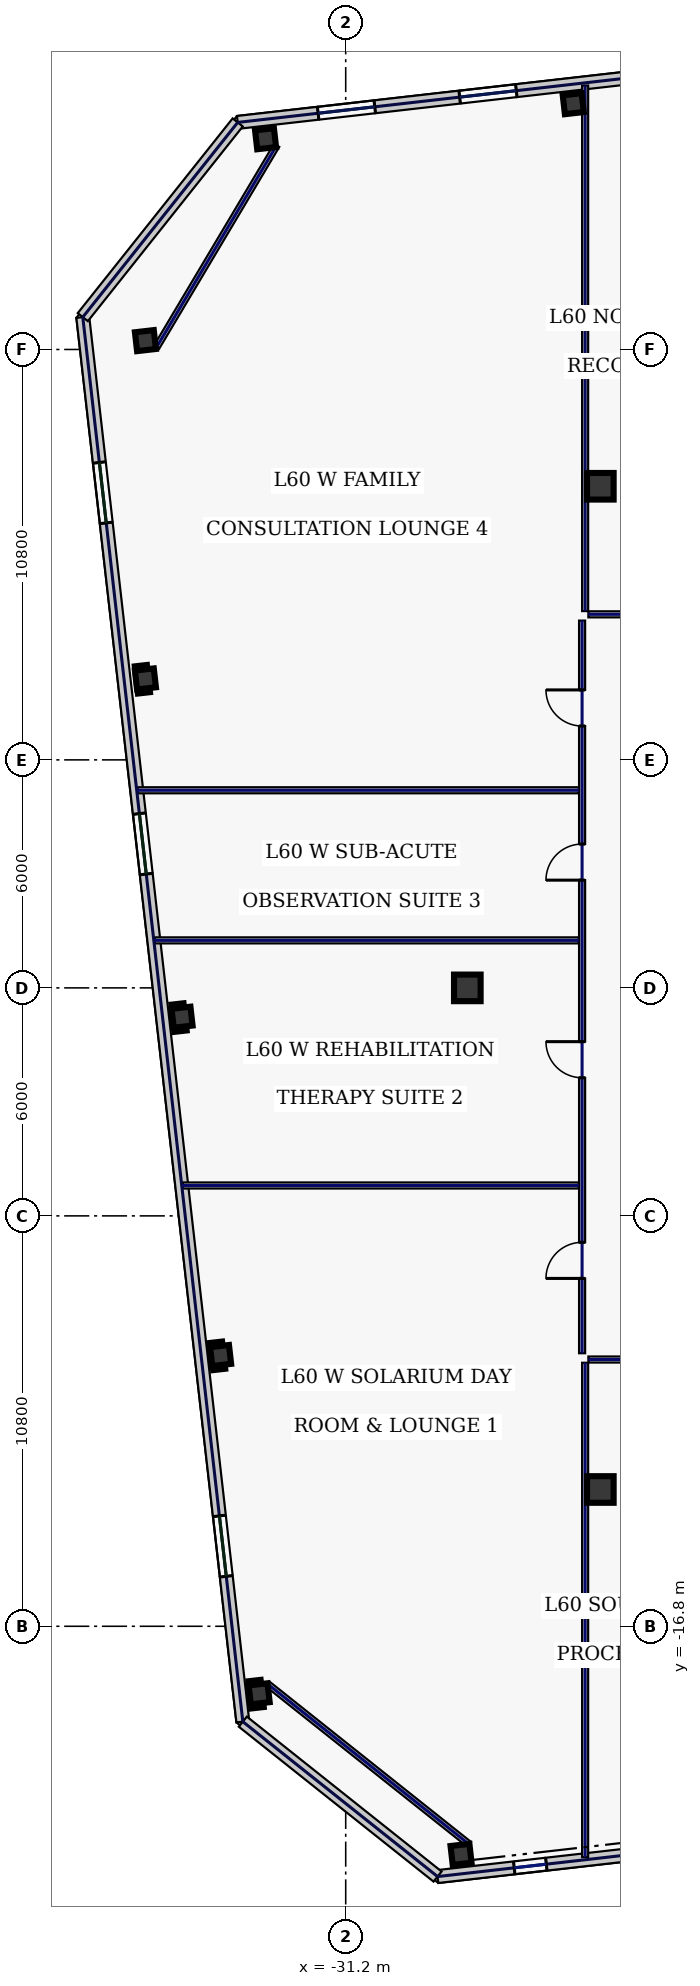
"""IFC4 building model, lengths in metres.
Left out: names, types, materials, properties, quantities, classifications, styles, units other than length and angle.
Written with IfcOpenShell. Run it as: python <this file> out.ifc"""

import sys

from ifc_helpers import new_model, si_unit, direction, frame, frame_2d, origin, origin_2d, place, context, subcontext, project, spatial, rectangle, hollow_rectangle, extrude, element, fill, save


model = new_model("IFC4")
c1 = context("Model", 3, precision=1e-05, world=origin(), true_north=direction((0.0, 1.0)))
c2 = subcontext(c1, "Body", "Model", "MODEL_VIEW")
j1 = project(units=[si_unit("LENGTHUNIT", "METRE"), si_unit("PLANEANGLEUNIT", "RADIAN")], contexts=[c1])
p1 = place(None, origin())
s1 = spatial("IfcSite", under=j1, at=p1, CompositionType="ELEMENT")
p2 = place(p1, origin())
s2 = spatial("IfcBuilding", under=s1, at=p2, CompositionType="ELEMENT")
p3 = place(p2, frame((0.0, 0.0, 259.0)))
s3 = spatial("IfcBuildingStorey", under=s2, at=p3, CompositionType="ELEMENT", Elevation=259.0)
for number, where, z_axis, x_axis in (
    (1, (-24.5, -13.2, 0.0), (0.0, 0.0, 1.0), (1.0, 0.0, 0.0)),
    (2, (-24.5, 13.2, 0.0), (0.0, 0.0, 1.0), (1.0, 0.0, 0.0)),
    (3, (-28.0, 0.0, 0.0), (0.0, 0.0, 1.0), (1.0, 0.0, 0.0)),
):
    element("IfcColumn", number, at=place(p3, frame(where, z_axis=z_axis, x_axis=x_axis)), inside=s3, PredefinedType="COLUMN", context=c2, shape_type="SweptSolid", body=[
        extrude(hollow_rectangle(XDim=0.7, YDim=0.7, WallThickness=0.032, at=origin_2d()), origin(), (0.0, 0.0, 1.0), 3.74),
    ])
for number, where, z_axis, x_axis in (
    (4, (-28.165, -22.802, 0.0), (0.0, 0.0, 1.0), (0.994, 0.113, 0.0)),
    (5, (-25.212, 23.268, 0.0), (0.0, 0.0, 1.0), (0.994, 0.113, 0.0)),
    (6, (-33.309, 22.345, 0.0), (0.0, 0.0, 1.0), (0.994, 0.113, 0.0)),
    (7, (-36.47, 17.033, 0.0), (0.0, 0.0, 1.0), (0.994, 0.113, 0.0)),
    (8, (-36.47, 8.131, 0.0), (0.0, 0.0, 1.0), (0.994, 0.113, 0.0)),
    (9, (-35.506, -0.772, 0.0), (0.0, 0.0, 1.0), (0.994, 0.113, 0.0)),
    (10, (-34.491, -9.674, 0.0), (0.0, 0.0, 1.0), (0.994, 0.113, 0.0)),
    (11, (-33.477, -18.577, 0.0), (0.0, 0.0, 1.0), (0.994, 0.113, 0.0)),
):
    element("IfcColumn", number, at=place(p3, frame(where, z_axis=z_axis, x_axis=x_axis)), inside=s3, PredefinedType="COLUMN", context=c2, shape_type="SweptSolid", body=[
        extrude(hollow_rectangle(XDim=0.5, YDim=0.5, WallThickness=0.025, at=origin_2d()), origin(), (0.0, 0.0, 1.0), 3.74),
    ])
p4 = place(p3, frame((-28.783, -23.386, 0.0), z_axis=(0.0, 0.0, 1.0), x_axis=(0.993572271362, 0.113199565282, 0.0)))
e12 = element("IfcWall", 12, at=p4, inside=s3, PredefinedType="STANDARD", context=c2, shape_type="SweptSolid", body=[
    extrude(rectangle(XDim=18.651, YDim=0.34, at=frame_2d((9.326, 0.0))), origin(), (0.0, 0.0, 1.0), 3.74),
])
p5 = place(p4, frame((2.03, 0.0, 0.88)))
e13 = element("IfcOpeningElement", 13, at=p5, cuts=e12, PredefinedType="OPENING", context=c2, shape_type="SweptSolid", body=[
    extrude(rectangle(XDim=0.85, YDim=1.85, at=frame_2d((0.425, 0.925))), frame((0.0, 0.18, 0.0), z_axis=(0.0, -1.0, 0.0), x_axis=(1.0, 0.0, 0.0)), (0.0, 0.0, 1.0), 0.36),
])
p6 = place(p4, frame((5.779, 0.0, 0.88)))
e14 = element("IfcOpeningElement", 14, at=p6, cuts=e12, PredefinedType="OPENING", context=c2, shape_type="SweptSolid", body=[
    extrude(rectangle(XDim=1.7, YDim=1.95, at=frame_2d((0.85, 0.975))), frame((0.0, 0.18, 0.0), z_axis=(0.0, -1.0, 0.0), x_axis=(1.0, 0.0, 0.0)), (0.0, 0.0, 1.0), 0.36),
])
p7 = place(p4, frame((10.179, 0.0, 0.88)))
e15 = element("IfcOpeningElement", 15, at=p7, cuts=e12, PredefinedType="OPENING", context=c2, shape_type="SweptSolid", body=[
    extrude(rectangle(XDim=1.7, YDim=1.95, at=frame_2d((0.85, 0.975))), frame((0.0, 0.18, 0.0), z_axis=(0.0, -1.0, 0.0), x_axis=(1.0, 0.0, 0.0)), (0.0, 0.0, 1.0), 0.36),
])
p8 = place(p4, frame((13.927, 0.0, 0.88)))
e16 = element("IfcOpeningElement", 16, at=p8, cuts=e12, PredefinedType="OPENING", context=c2, shape_type="SweptSolid", body=[
    extrude(rectangle(XDim=1.7, YDim=1.95, at=frame_2d((0.85, 0.975))), frame((0.0, 0.18, 0.0), z_axis=(0.0, -1.0, 0.0), x_axis=(1.0, 0.0, 0.0)), (0.0, 0.0, 1.0), 0.36),
])
p9 = place(p3, frame((-15.51, 24.886, 0.0), z_axis=(0.0, 0.0, 1.0), x_axis=(-0.993572271362, -0.113199565282, 0.0)))
e17 = element("IfcWall", 17, at=p9, inside=s3, PredefinedType="STANDARD", context=c2, shape_type="SweptSolid", body=[
    extrude(rectangle(XDim=18.651, YDim=0.34, at=frame_2d((9.326, 0.0))), origin(), (0.0, 0.0, 1.0), 3.74),
])
p10 = place(p9, frame((15.021, 0.0, 0.83)))
e18 = element("IfcOpeningElement", 18, at=p10, cuts=e17, PredefinedType="OPENING", context=c2, shape_type="SweptSolid", body=[
    extrude(rectangle(XDim=1.5, YDim=2.0, at=frame_2d((0.75, 1.0))), frame((0.0, 0.18, 0.0), z_axis=(0.0, -1.0, 0.0), x_axis=(1.0, 0.0, 0.0)), (0.0, 0.0, 1.0), 0.36),
])
p11 = place(p9, frame((11.273, 0.0, 0.83)))
e19 = element("IfcOpeningElement", 19, at=p11, cuts=e17, PredefinedType="OPENING", context=c2, shape_type="SweptSolid", body=[
    extrude(rectangle(XDim=1.5, YDim=2.0, at=frame_2d((0.75, 1.0))), frame((0.0, 0.18, 0.0), z_axis=(0.0, -1.0, 0.0), x_axis=(1.0, 0.0, 0.0)), (0.0, 0.0, 1.0), 0.36),
])
p12 = place(p9, frame((6.873, 0.0, 0.83)))
e20 = element("IfcOpeningElement", 20, at=p12, cuts=e17, PredefinedType="OPENING", context=c2, shape_type="SweptSolid", body=[
    extrude(rectangle(XDim=1.5, YDim=2.0, at=frame_2d((0.75, 1.0))), frame((0.0, 0.18, 0.0), z_axis=(0.0, -1.0, 0.0), x_axis=(1.0, 0.0, 0.0)), (0.0, 0.0, 1.0), 0.36),
])
p13 = place(p9, frame((3.125, 0.0, 0.83)))
e21 = element("IfcOpeningElement", 21, at=p13, cuts=e17, PredefinedType="OPENING", context=c2, shape_type="SweptSolid", body=[
    extrude(rectangle(XDim=0.85, YDim=1.85, at=frame_2d((0.425, 0.925))), frame((0.0, 0.18, 0.0), z_axis=(0.0, -1.0, 0.0), x_axis=(1.0, 0.0, 0.0)), (0.0, 0.0, 1.0), 0.36),
])
p14 = place(p3, frame((-38.118, 17.651, 0.0), z_axis=(0.0, 0.0, 1.0), x_axis=(0.11320360501, -0.9935718111, 0.0)))
e22 = element("IfcWall", 22, at=p14, inside=s3, PredefinedType="STANDARD", context=c2, shape_type="SweptSolid", body=[
    extrude(rectangle(XDim=37.2, YDim=0.34, at=frame_2d((18.6, 0.0))), origin(), (0.0, 0.0, 1.0), 3.74),
])
p15 = place(p14, frame((3.85, 0.0, 0.58)))
e23 = element("IfcOpeningElement", 23, at=p15, cuts=e22, PredefinedType="OPENING", context=c2, shape_type="SweptSolid", body=[
    extrude(rectangle(XDim=1.6, YDim=2.3, at=frame_2d((0.8, 1.15))), frame((0.0, 0.18, 0.0), z_axis=(0.0, -1.0, 0.0), x_axis=(1.0, 0.0, 0.0)), (0.0, 0.0, 1.0), 0.36),
])
p16 = place(p14, frame((13.15, 0.0, 0.58)))
e24 = element("IfcOpeningElement", 24, at=p16, cuts=e22, PredefinedType="OPENING", context=c2, shape_type="SweptSolid", body=[
    extrude(rectangle(XDim=1.6, YDim=2.3, at=frame_2d((0.8, 1.15))), frame((0.0, 0.18, 0.0), z_axis=(0.0, -1.0, 0.0), x_axis=(1.0, 0.0, 0.0)), (0.0, 0.0, 1.0), 0.36),
])
p17 = place(p14, frame((31.75, 0.0, 0.58)))
e25 = element("IfcOpeningElement", 25, at=p17, cuts=e22, PredefinedType="OPENING", context=c2, shape_type="SweptSolid", body=[
    extrude(rectangle(XDim=1.6, YDim=2.3, at=frame_2d((0.8, 1.15))), frame((0.0, 0.18, 0.0), z_axis=(0.0, -1.0, 0.0), x_axis=(1.0, 0.0, 0.0)), (0.0, 0.0, 1.0), 0.36),
])
for number, where, z_axis, x_axis in (
    (26, (-34.042, 22.775, 0.0), (0.0, 0.0, 1.0), (-0.623, -0.783, 0.0)),
    (27, (-33.907, -19.31, 0.0), (0.0, 0.0, 1.0), (0.783, -0.623, 0.0)),
):
    element("IfcWall", number, at=place(p3, frame(where, z_axis=z_axis, x_axis=x_axis)), inside=s3, PredefinedType="STANDARD", context=c2, shape_type="SweptSolid", body=[
        extrude(rectangle(XDim=6.548, YDim=0.34, at=frame_2d((3.274, 0.0))), origin(), (0.0, 0.0, 1.0), 3.74),
    ])
p18 = place(p3, frame((-33.016, 22.171, 0.0), z_axis=(0.0, 0.0, 1.0), x_axis=(-0.511385266265, -0.859351563359, 0.0)))
e28 = element("IfcWall", 28, at=p18, inside=s3, PredefinedType="PARTITIONING", context=c2, shape_type="SweptSolid", body=[
    extrude(rectangle(XDim=6.182, YDim=0.16, at=frame_2d((3.091, 0.0))), origin(), (0.0, 0.0, 1.0), 3.74),
])
p19 = place(p3, frame((-33.265, -18.311, 0.0), z_axis=(0.0, 0.0, 1.0), x_axis=(0.782602647064, -0.622521563328, 0.0)))
e29 = element("IfcWall", 29, at=p19, inside=s3, PredefinedType="PARTITIONING", context=c2, shape_type="SweptSolid", body=[
    extrude(rectangle(XDim=6.788, YDim=0.16, at=frame_2d((3.394, 0.0))), origin(), (0.0, 0.0, 1.0), 3.74),
])
p20 = place(p3, frame((-24.98, -9.615, 0.0), z_axis=(0.0, 0.0, 1.0), x_axis=(0.0, 1.0, 0.0)))
e30 = element("IfcWall", 30, at=p20, inside=s3, PredefinedType="PARTITIONING", context=c2, shape_type="SweptSolid", body=[
    extrude(rectangle(XDim=19.28, YDim=0.16, at=frame_2d((9.64, 0.0))), origin(), (0.0, 0.0, 1.0), 3.74),
])
p21 = place(p20, frame((1.969, 0.0, 0.0)))
e31 = element("IfcOpeningElement", 31, at=p21, cuts=e30, PredefinedType="OPENING", context=c2, shape_type="SweptSolid", body=[
    extrude(rectangle(XDim=0.95, YDim=2.2, at=frame_2d((0.475, 1.1))), frame((0.0, 0.09, 0.0), z_axis=(0.0, -1.0, 0.0), x_axis=(1.0, 0.0, 0.0)), (0.0, 0.0, 1.0), 0.18),
])
p22 = place(p20, frame((7.25, 0.0, 0.0)))
e32 = element("IfcOpeningElement", 32, at=p22, cuts=e30, PredefinedType="OPENING", context=c2, shape_type="SweptSolid", body=[
    extrude(rectangle(XDim=0.95, YDim=2.2, at=frame_2d((0.475, 1.1))), frame((0.0, 0.09, 0.0), z_axis=(0.0, -1.0, 0.0), x_axis=(1.0, 0.0, 0.0)), (0.0, 0.0, 1.0), 0.18),
])
p23 = place(p20, frame((12.45, 0.0, 0.0)))
e33 = element("IfcOpeningElement", 33, at=p23, cuts=e30, PredefinedType="OPENING", context=c2, shape_type="SweptSolid", body=[
    extrude(rectangle(XDim=0.95, YDim=2.2, at=frame_2d((0.475, 1.1))), frame((0.0, 0.09, 0.0), z_axis=(0.0, -1.0, 0.0), x_axis=(1.0, 0.0, 0.0)), (0.0, 0.0, 1.0), 0.18),
])
p24 = place(p20, frame((16.506, 0.0, 0.0)))
e34 = element("IfcOpeningElement", 34, at=p24, cuts=e30, PredefinedType="OPENING", context=c2, shape_type="SweptSolid", body=[
    extrude(rectangle(XDim=0.95, YDim=2.2, at=frame_2d((0.475, 1.1))), frame((0.0, 0.09, 0.0), z_axis=(0.0, -1.0, 0.0), x_axis=(1.0, 0.0, 0.0)), (0.0, 0.0, 1.0), 0.18),
])
p25 = place(p3, frame((-24.815, 9.83, 0.0), z_axis=(0.0, 0.0, 1.0), x_axis=(1.0, 0.0, 0.0)))
e35 = element("IfcWall", 35, at=p25, inside=s3, PredefinedType="PARTITIONING", context=c2, shape_type="SweptSolid", body=[
    extrude(rectangle(XDim=49.63, YDim=0.16, at=frame_2d((24.815, 0.0))), origin(), (0.0, 0.0, 1.0), 3.74),
])
p26 = place(p25, frame((1.869, 0.0, 0.0)))
e36 = element("IfcOpeningElement", 36, at=p26, cuts=e35, PredefinedType="OPENING", context=c2, shape_type="SweptSolid", body=[
    extrude(rectangle(XDim=1.3, YDim=2.2, at=frame_2d((0.65, 1.1))), frame((0.0, 0.09, 0.0), z_axis=(0.0, -1.0, 0.0), x_axis=(1.0, 0.0, 0.0)), (0.0, 0.0, 1.0), 0.18),
])
p27 = place(p25, frame((7.613, 0.0, 0.0)))
e37 = element("IfcOpeningElement", 37, at=p27, cuts=e35, PredefinedType="OPENING", context=c2, shape_type="SweptSolid", body=[
    extrude(rectangle(XDim=0.95, YDim=2.2, at=frame_2d((0.475, 1.1))), frame((0.0, 0.09, 0.0), z_axis=(0.0, -1.0, 0.0), x_axis=(1.0, 0.0, 0.0)), (0.0, 0.0, 1.0), 0.18),
])
p28 = place(p25, frame((14.038, 0.0, 0.0)))
e38 = element("IfcOpeningElement", 38, at=p28, cuts=e35, PredefinedType="OPENING", context=c2, shape_type="SweptSolid", body=[
    extrude(rectangle(XDim=0.95, YDim=2.2, at=frame_2d((0.475, 1.1))), frame((0.0, 0.09, 0.0), z_axis=(0.0, -1.0, 0.0), x_axis=(1.0, 0.0, 0.0)), (0.0, 0.0, 1.0), 0.18),
])
p29 = place(p25, frame((21.125, 0.0, 0.0)))
e39 = element("IfcOpeningElement", 39, at=p29, cuts=e35, PredefinedType="OPENING", context=c2, shape_type="SweptSolid", body=[
    extrude(rectangle(XDim=1.3, YDim=2.2, at=frame_2d((0.65, 1.1))), frame((0.0, 0.09, 0.0), z_axis=(0.0, -1.0, 0.0), x_axis=(1.0, 0.0, 0.0)), (0.0, 0.0, 1.0), 0.18),
])
p30 = place(p25, frame((29.225, 0.0, 0.0)))
e40 = element("IfcOpeningElement", 40, at=p30, cuts=e35, PredefinedType="OPENING", context=c2, shape_type="SweptSolid", body=[
    extrude(rectangle(XDim=1.3, YDim=2.2, at=frame_2d((0.65, 1.1))), frame((0.0, 0.09, 0.0), z_axis=(0.0, -1.0, 0.0), x_axis=(1.0, 0.0, 0.0)), (0.0, 0.0, 1.0), 0.18),
])
p31 = place(p25, frame((36.312, 0.0, 0.0)))
e41 = element("IfcOpeningElement", 41, at=p31, cuts=e35, PredefinedType="OPENING", context=c2, shape_type="SweptSolid", body=[
    extrude(rectangle(XDim=0.95, YDim=2.2, at=frame_2d((0.475, 1.1))), frame((0.0, 0.09, 0.0), z_axis=(0.0, -1.0, 0.0), x_axis=(1.0, 0.0, 0.0)), (0.0, 0.0, 1.0), 0.18),
])
p32 = place(p25, frame((41.863, 0.0, 0.0)))
e42 = element("IfcOpeningElement", 42, at=p32, cuts=e35, PredefinedType="OPENING", context=c2, shape_type="SweptSolid", body=[
    extrude(rectangle(XDim=1.3, YDim=2.2, at=frame_2d((0.65, 1.1))), frame((0.0, 0.09, 0.0), z_axis=(0.0, -1.0, 0.0), x_axis=(1.0, 0.0, 0.0)), (0.0, 0.0, 1.0), 0.18),
])
p33 = place(p25, frame((46.806, 0.0, 0.0)))
e43 = element("IfcOpeningElement", 43, at=p33, cuts=e35, PredefinedType="OPENING", context=c2, shape_type="SweptSolid", body=[
    extrude(rectangle(XDim=0.95, YDim=2.2, at=frame_2d((0.475, 1.1))), frame((0.0, 0.09, 0.0), z_axis=(0.0, -1.0, 0.0), x_axis=(1.0, 0.0, 0.0)), (0.0, 0.0, 1.0), 0.18),
])
p34 = place(p3, frame((-15.065, -9.78, 0.0), z_axis=(0.0, 0.0, 1.0), x_axis=(-1.0, 0.0, 0.0)))
e44 = element("IfcWall", 44, at=p34, inside=s3, PredefinedType="PARTITIONING", context=c2, shape_type="SweptSolid", body=[
    extrude(rectangle(XDim=9.75, YDim=0.16, at=frame_2d((4.875, 0.0))), origin(), (0.0, 0.0, 1.0), 3.74),
])
p35 = place(p34, frame((6.926, 0.0, 0.0)))
e45 = element("IfcOpeningElement", 45, at=p35, cuts=e44, PredefinedType="OPENING", context=c2, shape_type="SweptSolid", body=[
    extrude(rectangle(XDim=0.95, YDim=2.2, at=frame_2d((0.475, 1.1))), frame((0.0, 0.09, 0.0), z_axis=(0.0, -1.0, 0.0), x_axis=(1.0, 0.0, 0.0)), (0.0, 0.0, 1.0), 0.18),
])
p36 = place(p34, frame((2.354, 0.0, 0.0)))
e46 = element("IfcOpeningElement", 46, at=p36, cuts=e44, PredefinedType="OPENING", context=c2, shape_type="SweptSolid", body=[
    extrude(rectangle(XDim=0.95, YDim=2.2, at=frame_2d((0.475, 1.1))), frame((0.0, 0.09, 0.0), z_axis=(0.0, -1.0, 0.0), x_axis=(1.0, 0.0, 0.0)), (0.0, 0.0, 1.0), 0.18),
])
p37 = place(p3, frame((-24.9, 9.915, 0.0), z_axis=(0.0, 0.0, 1.0), x_axis=(0.0, 1.0, 0.0)))
e47 = element("IfcWall", 47, at=p37, inside=s3, PredefinedType="PARTITIONING", context=c2, shape_type="SweptSolid", body=[
    extrude(rectangle(XDim=13.831, YDim=0.16, at=frame_2d((6.916, 0.0))), origin(), (0.0, 0.0, 1.0), 3.285),
])
p38 = place(p3, frame((-24.9, -22.873, 0.0), z_axis=(0.0, 0.0, 1.0), x_axis=(0.0, 1.0, 0.0)))
e48 = element("IfcWall", 48, at=p38, inside=s3, PredefinedType="PARTITIONING", context=c2, shape_type="SweptSolid", body=[
    extrude(rectangle(XDim=13.008, YDim=0.16, at=frame_2d((6.504, 0.0))), origin(), (0.0, 0.0, 1.0), 3.74),
])
p39 = place(p3, frame((-35.494, -5.2, 0.0), z_axis=(0.0, 0.0, 1.0), x_axis=(1.0, 0.0, 0.0)))
e49 = element("IfcWall", 49, at=p39, inside=s3, PredefinedType="PARTITIONING", context=c2, shape_type="SweptSolid", body=[
    extrude(rectangle(XDim=10.429, YDim=0.16, at=frame_2d((5.215, 0.0))), origin(), (0.0, 0.0, 1.0), 3.74),
])
p40 = place(p3, frame((-36.229, 1.25, 0.0), z_axis=(0.0, 0.0, 1.0), x_axis=(1.0, 0.0, 0.0)))
e50 = element("IfcWall", 50, at=p40, inside=s3, PredefinedType="PARTITIONING", context=c2, shape_type="SweptSolid", body=[
    extrude(rectangle(XDim=11.165, YDim=0.16, at=frame_2d((5.582, 0.0))), origin(), (0.0, 0.0, 1.0), 3.74),
])
p41 = place(p3, frame((-36.679, 5.2, 0.0), z_axis=(0.0, 0.0, 1.0), x_axis=(1.0, 0.0, 0.0)))
e51 = element("IfcWall", 51, at=p41, inside=s3, PredefinedType="PARTITIONING", context=c2, shape_type="SweptSolid", body=[
    extrude(rectangle(XDim=11.615, YDim=0.16, at=frame_2d((5.807, 0.0))), origin(), (0.0, 0.0, 1.0), 3.74),
])
p42 = place(p5, origin())
e52 = element("IfcWindow", 52, at=p42, inside=s3, PartitioningType="SINGLE_PANEL", PredefinedType="WINDOW", context=c2, shape_type="SweptSolid", body=[
    extrude(rectangle(XDim=0.85, YDim=1.85, at=frame_2d((0.425, 0.925))), frame((0.0, 0.03, 0.0), z_axis=(0.0, -1.0, 0.0), x_axis=(1.0, 0.0, 0.0)), (0.0, 0.0, 1.0), 0.06),
])
fill(e13, e52)
p43 = place(p10, origin())
e53 = element("IfcWindow", 53, at=p43, inside=s3, PartitioningType="SINGLE_PANEL", PredefinedType="WINDOW", context=c2, shape_type="SweptSolid", body=[
    extrude(rectangle(XDim=1.5, YDim=2.0, at=frame_2d((0.75, 1.0))), frame((0.0, 0.03, 0.0), z_axis=(0.0, -1.0, 0.0), x_axis=(1.0, 0.0, 0.0)), (0.0, 0.0, 1.0), 0.06),
])
fill(e18, e53)
p44 = place(p11, origin())
e54 = element("IfcWindow", 54, at=p44, inside=s3, PartitioningType="SINGLE_PANEL", PredefinedType="WINDOW", context=c2, shape_type="SweptSolid", body=[
    extrude(rectangle(XDim=1.5, YDim=2.0, at=frame_2d((0.75, 1.0))), frame((0.0, 0.03, 0.0), z_axis=(0.0, -1.0, 0.0), x_axis=(1.0, 0.0, 0.0)), (0.0, 0.0, 1.0), 0.06),
])
fill(e19, e54)
p45 = place(p15, origin())
e55 = element("IfcWindow", 55, at=p45, inside=s3, PartitioningType="SINGLE_PANEL", PredefinedType="WINDOW", context=c2, shape_type="SweptSolid", body=[
    extrude(rectangle(XDim=1.6, YDim=2.3, at=frame_2d((0.8, 1.15))), frame((0.0, 0.03, 0.0), z_axis=(0.0, -1.0, 0.0), x_axis=(1.0, 0.0, 0.0)), (0.0, 0.0, 1.0), 0.06),
])
fill(e23, e55)
p46 = place(p16, origin())
e56 = element("IfcWindow", 56, at=p46, inside=s3, PartitioningType="SINGLE_PANEL", PredefinedType="WINDOW", context=c2, shape_type="SweptSolid", body=[
    extrude(rectangle(XDim=1.6, YDim=2.3, at=frame_2d((0.8, 1.15))), frame((0.0, 0.03, 0.0), z_axis=(0.0, -1.0, 0.0), x_axis=(1.0, 0.0, 0.0)), (0.0, 0.0, 1.0), 0.06),
])
fill(e24, e56)
p47 = place(p17, origin())
e57 = element("IfcWindow", 57, at=p47, inside=s3, PartitioningType="SINGLE_PANEL", PredefinedType="WINDOW", context=c2, shape_type="SweptSolid", body=[
    extrude(rectangle(XDim=1.6, YDim=2.3, at=frame_2d((0.8, 1.15))), frame((0.0, 0.03, 0.0), z_axis=(0.0, -1.0, 0.0), x_axis=(1.0, 0.0, 0.0)), (0.0, 0.0, 1.0), 0.06),
])
fill(e25, e57)
p48 = place(p21, origin())
e58 = element("IfcDoor", 58, at=p48, inside=s3, OperationType="SINGLE_SWING_LEFT", PredefinedType="DOOR", context=c2, shape_type="SweptSolid", body=[
    extrude(rectangle(XDim=0.95, YDim=2.2, at=frame_2d((0.475, 1.1))), frame((0.0, 0.025, 0.0), z_axis=(0.0, -1.0, 0.0), x_axis=(1.0, 0.0, 0.0)), (0.0, 0.0, 1.0), 0.05),
])
fill(e31, e58)
p49 = place(p22, origin())
e59 = element("IfcDoor", 59, at=p49, inside=s3, OperationType="SINGLE_SWING_RIGHT", PredefinedType="DOOR", context=c2, shape_type="SweptSolid", body=[
    extrude(rectangle(XDim=0.95, YDim=2.2, at=frame_2d((0.475, 1.1))), frame((0.0, 0.025, 0.0), z_axis=(0.0, -1.0, 0.0), x_axis=(1.0, 0.0, 0.0)), (0.0, 0.0, 1.0), 0.05),
])
fill(e32, e59)
p50 = place(p23, origin())
e60 = element("IfcDoor", 60, at=p50, inside=s3, OperationType="SINGLE_SWING_LEFT", PredefinedType="DOOR", context=c2, shape_type="SweptSolid", body=[
    extrude(rectangle(XDim=0.95, YDim=2.2, at=frame_2d((0.475, 1.1))), frame((0.0, 0.025, 0.0), z_axis=(0.0, -1.0, 0.0), x_axis=(1.0, 0.0, 0.0)), (0.0, 0.0, 1.0), 0.05),
])
fill(e33, e60)
p51 = place(p24, origin())
e61 = element("IfcDoor", 61, at=p51, inside=s3, OperationType="SINGLE_SWING_RIGHT", PredefinedType="DOOR", context=c2, shape_type="SweptSolid", body=[
    extrude(rectangle(XDim=0.95, YDim=2.2, at=frame_2d((0.475, 1.1))), frame((0.0, 0.025, 0.0), z_axis=(0.0, -1.0, 0.0), x_axis=(1.0, 0.0, 0.0)), (0.0, 0.0, 1.0), 0.05),
])
fill(e34, e61)
save(model, sys.argv[1])
